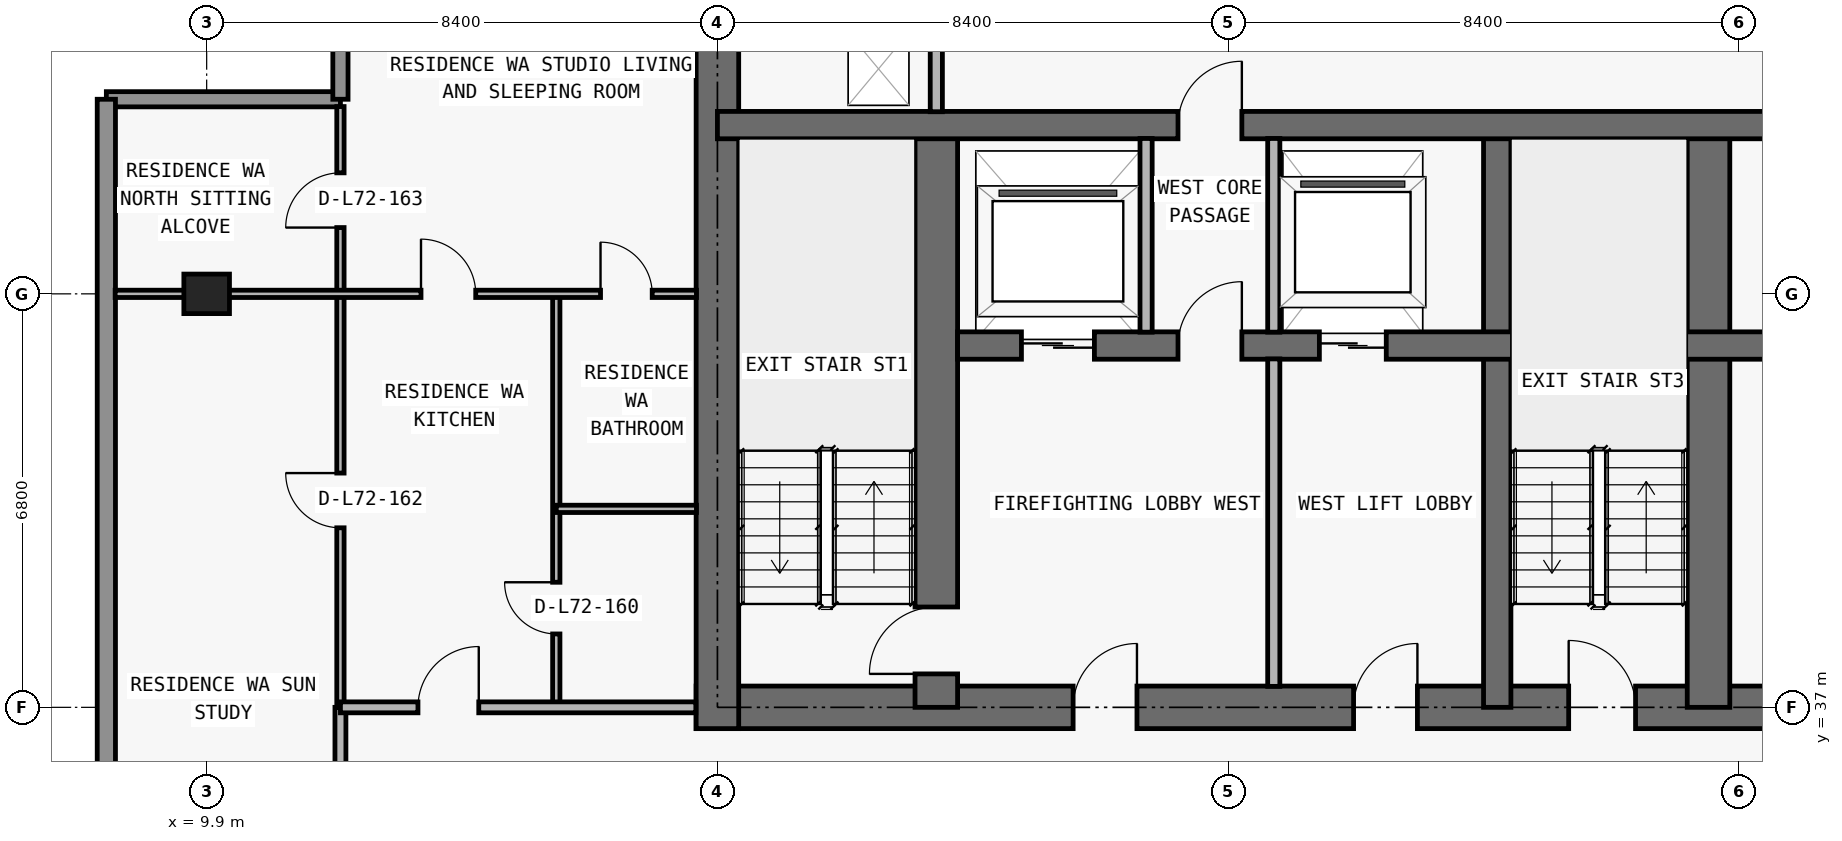
"""IFC4 building model, lengths in metres.
Left out: names, types, materials, properties, quantities, classifications, styles, units other than length and angle.
Written with IfcOpenShell. Run it as: python <this file> out.ifc"""

import sys

from ifc_helpers import new_model, si_unit, direction, frame, frame_2d, origin, origin_2d, place, context, subcontext, project, spatial, rectangle, extrude, element, fill, save


model = new_model("IFC4")
c1 = context("Model", 3, precision=1e-05, world=origin(), true_north=direction((0.0, 1.0)))
c2 = subcontext(c1, "Body", "Model", "MODEL_VIEW")
j1 = project(units=[si_unit("LENGTHUNIT", "METRE"), si_unit("PLANEANGLEUNIT", "RADIAN")], contexts=[c1])
p1 = place(None, origin())
s1 = spatial("IfcSite", under=j1, at=p1, CompositionType="ELEMENT")
p2 = place(p1, origin())
s2 = spatial("IfcBuilding", under=s1, at=p2, CompositionType="ELEMENT")
p3 = place(p2, frame((0.0, 0.0, 256.2)))
s3 = spatial("IfcBuildingStorey", under=s2, at=p3, CompositionType="ELEMENT", Elevation=256.2)
p4 = place(p3, frame((9.9, 43.8, 0.0), z_axis=(0.0, 0.0, 1.0), x_axis=(1.0, 0.0, 0.0)))
e1 = element("IfcColumn", 1, at=p4, inside=s3, PredefinedType="COLUMN", context=c2, shape_type="SweptSolid", body=[
    extrude(rectangle(XDim=0.75, YDim=0.65, at=origin_2d()), origin(), (0.0, 0.0, 1.0), 3.05),
])
p5 = place(p3, frame((17.95, 37.0, 0.0), z_axis=(0.0, 0.0, 1.0), x_axis=(1.0, 0.0, 0.0)))
e2 = element("IfcWall", 2, at=p5, inside=s3, PredefinedType="SHEAR", context=c2, shape_type="SweptSolid", body=[
    extrude(rectangle(XDim=41.9, YDim=0.7, at=frame_2d((20.95, 0.0))), origin(), (0.0, 0.0, 1.0), 3.05),
])
p6 = place(p5, frame((14.35, 0.0, 0.0)))
e3 = element("IfcOpeningElement", 3, at=p6, cuts=e2, PredefinedType="OPENING", context=c2, shape_type="SweptSolid", body=[
    extrude(rectangle(XDim=1.1, YDim=2.15, at=frame_2d((0.55, 1.075))), frame((0.0, 0.36, 0.0), z_axis=(0.0, -1.0, 0.0), x_axis=(1.0, 0.0, 0.0)), (0.0, 0.0, 1.0), 0.72),
])
p7 = place(p5, frame((6.2, 0.0, 0.0)))
e4 = element("IfcOpeningElement", 4, at=p7, cuts=e2, PredefinedType="OPENING", context=c2, shape_type="SweptSolid", body=[
    extrude(rectangle(XDim=1.05, YDim=2.15, at=frame_2d((0.525, 1.075))), frame((0.0, 0.36, 0.0), z_axis=(0.0, -1.0, 0.0), x_axis=(1.0, 0.0, 0.0)), (0.0, 0.0, 1.0), 0.72),
])
p8 = place(p5, frame((34.7, 0.0, 0.0)))
e5 = element("IfcOpeningElement", 5, at=p8, cuts=e2, PredefinedType="OPENING", context=c2, shape_type="SweptSolid", body=[
    extrude(rectangle(XDim=1.05, YDim=2.15, at=frame_2d((0.525, 1.075))), frame((0.0, 0.36, 0.0), z_axis=(0.0, -1.0, 0.0), x_axis=(1.0, 0.0, 0.0)), (0.0, 0.0, 1.0), 0.72),
])
p9 = place(p5, frame((10.812, 0.0, 0.0)))
e6 = element("IfcOpeningElement", 6, at=p9, cuts=e2, PredefinedType="OPENING", context=c2, shape_type="SweptSolid", body=[
    extrude(rectangle(XDim=1.05, YDim=2.15, at=frame_2d((0.525, 1.075))), frame((0.0, 0.36, 0.0), z_axis=(0.0, -1.0, 0.0), x_axis=(1.0, 0.0, 0.0)), (0.0, 0.0, 1.0), 0.72),
])
p10 = place(p5, frame((24.05, 0.0, 0.0)))
e7 = element("IfcOpeningElement", 7, at=p10, cuts=e2, PredefinedType="OPENING", context=c2, shape_type="SweptSolid", body=[
    extrude(rectangle(XDim=1.05, YDim=2.15, at=frame_2d((0.525, 1.075))), frame((0.0, 0.36, 0.0), z_axis=(0.0, -1.0, 0.0), x_axis=(1.0, 0.0, 0.0)), (0.0, 0.0, 1.0), 0.72),
])
p11 = place(p3, frame((18.3, 36.65, 0.0), z_axis=(0.0, 0.0, 1.0), x_axis=(0.0, 1.0, 0.0)))
e8 = element("IfcWall", 8, at=p11, inside=s3, PredefinedType="SHEAR", context=c2, shape_type="SweptSolid", body=[
    extrude(rectangle(XDim=13.95, YDim=0.7, at=frame_2d((6.975, 0.0))), origin(), (0.0, 0.0, 1.0), 3.05),
])
p12 = place(p3, frame((21.9, 37.0, 0.0), z_axis=(0.0, 0.0, 1.0), x_axis=(0.0, 1.0, 0.0)))
e9 = element("IfcWall", 9, at=p12, inside=s3, PredefinedType="SHEAR", context=c2, shape_type="SweptSolid", body=[
    extrude(rectangle(XDim=9.575, YDim=0.7, at=frame_2d((4.788, 0.0))), origin(), (0.0, 0.0, 1.0), 3.05),
])
p13 = place(p12, frame((0.55, 0.0, 0.0)))
e10 = element("IfcOpeningElement", 10, at=p13, cuts=e9, PredefinedType="OPENING", context=c2, shape_type="SweptSolid", body=[
    extrude(rectangle(XDim=1.1, YDim=2.15, at=frame_2d((0.55, 1.075))), frame((0.0, 0.36, 0.0), z_axis=(0.0, -1.0, 0.0), x_axis=(1.0, 0.0, 0.0)), (0.0, 0.0, 1.0), 0.72),
])
p14 = place(p3, frame((31.125, 37.0, 0.0), z_axis=(0.0, 0.0, 1.0), x_axis=(0.0, 1.0, 0.0)))
e11 = element("IfcWall", 11, at=p14, inside=s3, PredefinedType="SHEAR", context=c2, shape_type="SweptSolid", body=[
    extrude(rectangle(XDim=9.575, YDim=0.45, at=frame_2d((4.788, 0.0))), origin(), (0.0, 0.0, 1.0), 3.05),
])
p15 = place(p3, frame((34.6, 37.0, 0.0), z_axis=(0.0, 0.0, 1.0), x_axis=(0.0, 1.0, 0.0)))
e12 = element("IfcWall", 12, at=p15, inside=s3, PredefinedType="SHEAR", context=c2, shape_type="SweptSolid", body=[
    extrude(rectangle(XDim=9.575, YDim=0.7, at=frame_2d((4.788, 0.0))), origin(), (0.0, 0.0, 1.0), 3.05),
])
p16 = place(p3, frame((22.25, 42.95, 0.0), z_axis=(0.0, 0.0, 1.0), x_axis=(1.0, 0.0, 0.0)))
e13 = element("IfcWall", 13, at=p16, inside=s3, PredefinedType="SHEAR", context=c2, shape_type="SweptSolid", body=[
    extrude(rectangle(XDim=33.3, YDim=0.45, at=frame_2d((16.65, 0.0))), origin(), (0.0, 0.0, 1.0), 3.05),
])
p17 = place(p16, frame((1.05, 0.0, 0.0)))
e14 = element("IfcOpeningElement", 14, at=p17, cuts=e13, PredefinedType="OPENING", context=c2, shape_type="SweptSolid", body=[
    extrude(rectangle(XDim=1.2, YDim=2.2, at=frame_2d((0.6, 1.1))), frame((0.0, 0.235, 0.0), z_axis=(0.0, -1.0, 0.0), x_axis=(1.0, 0.0, 0.0)), (0.0, 0.0, 1.0), 0.47),
])
p18 = place(p16, frame((31.05, 0.0, 0.0)))
e15 = element("IfcOpeningElement", 15, at=p18, cuts=e13, PredefinedType="OPENING", context=c2, shape_type="SweptSolid", body=[
    extrude(rectangle(XDim=1.2, YDim=2.2, at=frame_2d((0.6, 1.1))), frame((0.0, 0.235, 0.0), z_axis=(0.0, -1.0, 0.0), x_axis=(1.0, 0.0, 0.0)), (0.0, 0.0, 1.0), 0.47),
])
p19 = place(p16, frame((26.45, 0.0, 0.0)))
e16 = element("IfcOpeningElement", 16, at=p19, cuts=e13, PredefinedType="OPENING", context=c2, shape_type="SweptSolid", body=[
    extrude(rectangle(XDim=1.1, YDim=2.2, at=frame_2d((0.55, 1.1))), frame((0.0, 0.235, 0.0), z_axis=(0.0, -1.0, 0.0), x_axis=(1.0, 0.0, 0.0)), (0.0, 0.0, 1.0), 0.47),
])
p20 = place(p16, frame((5.95, 0.0, 0.0)))
e17 = element("IfcOpeningElement", 17, at=p20, cuts=e13, PredefinedType="OPENING", context=c2, shape_type="SweptSolid", body=[
    extrude(rectangle(XDim=1.1, YDim=2.2, at=frame_2d((0.55, 1.1))), frame((0.0, 0.235, 0.0), z_axis=(0.0, -1.0, 0.0), x_axis=(1.0, 0.0, 0.0)), (0.0, 0.0, 1.0), 0.47),
])
p21 = place(p16, frame((3.625, 0.0, 0.0)))
e18 = element("IfcOpeningElement", 18, at=p21, cuts=e13, PredefinedType="OPENING", context=c2, shape_type="SweptSolid", body=[
    extrude(rectangle(XDim=1.05, YDim=2.15, at=frame_2d((0.525, 1.075))), frame((0.0, 0.235, 0.0), z_axis=(0.0, -1.0, 0.0), x_axis=(1.0, 0.0, 0.0)), (0.0, 0.0, 1.0), 0.47),
])
p22 = place(p16, frame((28.675, 0.0, 0.0)))
e19 = element("IfcOpeningElement", 19, at=p22, cuts=e13, PredefinedType="OPENING", context=c2, shape_type="SweptSolid", body=[
    extrude(rectangle(XDim=1.05, YDim=2.15, at=frame_2d((0.525, 1.075))), frame((0.0, 0.235, 0.0), z_axis=(0.0, -1.0, 0.0), x_axis=(1.0, 0.0, 0.0)), (0.0, 0.0, 1.0), 0.47),
])
p23 = place(p16, frame((15.225, 0.0, 0.0)))
e20 = element("IfcOpeningElement", 20, at=p23, cuts=e13, PredefinedType="OPENING", context=c2, shape_type="SweptSolid", body=[
    extrude(rectangle(XDim=1.0, YDim=2.2, at=frame_2d((0.5, 1.1))), frame((0.0, 0.235, 0.0), z_axis=(0.0, -1.0, 0.0), x_axis=(1.0, 0.0, 0.0)), (0.0, 0.0, 1.0), 0.47),
])
p24 = place(p16, frame((21.975, 0.0, 0.0)))
e21 = element("IfcOpeningElement", 21, at=p24, cuts=e13, PredefinedType="OPENING", context=c2, shape_type="SweptSolid", body=[
    extrude(rectangle(XDim=1.0, YDim=2.2, at=frame_2d((0.5, 1.1))), frame((0.0, 0.235, 0.0), z_axis=(0.0, -1.0, 0.0), x_axis=(1.0, 0.0, 0.0)), (0.0, 0.0, 1.0), 0.47),
])
p25 = place(p3, frame((18.3, 46.575, 0.0), z_axis=(0.0, 0.0, 1.0), x_axis=(1.0, 0.0, 0.0)))
e22 = element("IfcWall", 22, at=p25, inside=s3, PredefinedType="SHEAR", context=c2, shape_type="SweptSolid", body=[
    extrude(rectangle(XDim=41.2, YDim=0.45, at=frame_2d((20.6, 0.0))), origin(), (0.0, 0.0, 1.0), 3.05),
])
p26 = place(p25, frame((7.575, 0.0, 0.0)))
e23 = element("IfcOpeningElement", 23, at=p26, cuts=e22, PredefinedType="OPENING", context=c2, shape_type="SweptSolid", body=[
    extrude(rectangle(XDim=1.05, YDim=2.15, at=frame_2d((0.525, 1.075))), frame((0.0, 0.235, 0.0), z_axis=(0.0, -1.0, 0.0), x_axis=(1.0, 0.0, 0.0)), (0.0, 0.0, 1.0), 0.47),
])
p27 = place(p25, frame((32.625, 0.0, 0.0)))
e24 = element("IfcOpeningElement", 24, at=p27, cuts=e22, PredefinedType="OPENING", context=c2, shape_type="SweptSolid", body=[
    extrude(rectangle(XDim=1.05, YDim=2.15, at=frame_2d((0.525, 1.075))), frame((0.0, 0.235, 0.0), z_axis=(0.0, -1.0, 0.0), x_axis=(1.0, 0.0, 0.0)), (0.0, 0.0, 1.0), 0.47),
])
p28 = place(p3, frame((8.25, 47.0, 0.0), z_axis=(0.0, 0.0, 1.0), x_axis=(1.0, 0.0, 0.0)))
e25 = element("IfcWall", 25, at=p28, inside=s3, PredefinedType="ELEMENTEDWALL", context=c2, shape_type="SweptSolid", body=[
    extrude(rectangle(XDim=3.85, YDim=0.25, at=frame_2d((1.925, 0.0))), origin(), (0.0, 0.0, 1.0), 3.05),
])
p29 = place(p3, frame((12.1, 47.0, 0.0), z_axis=(0.0, 0.0, 1.0), x_axis=(0.0, 1.0, 0.0)))
e26 = element("IfcWall", 26, at=p29, inside=s3, PredefinedType="ELEMENTEDWALL", context=c2, shape_type="SweptSolid", body=[
    extrude(rectangle(XDim=3.45, YDim=0.25, at=frame_2d((1.725, 0.0))), origin(), (0.0, 0.0, 1.0), 3.05),
])
p30 = place(p3, frame((8.25, 30.15, 0.0), z_axis=(0.0, 0.0, 1.0), x_axis=(0.0, 1.0, 0.0)))
e27 = element("IfcWall", 27, at=p30, inside=s3, PredefinedType="STANDARD", context=c2, shape_type="SweptSolid", body=[
    extrude(rectangle(XDim=16.85, YDim=0.3, at=frame_2d((8.425, 0.0))), origin(), (0.0, 0.0, 1.0), 3.05),
])
p31 = place(p3, frame((12.1, 34.305, 0.0), z_axis=(0.0, 0.0, 1.0), x_axis=(0.0, 1.0, 0.0)))
e28 = element("IfcWall", 28, at=p31, inside=s3, PredefinedType="PARTITIONING", context=c2, shape_type="SweptSolid", body=[
    extrude(rectangle(XDim=2.695, YDim=0.18, at=frame_2d((1.348, 0.0))), origin(), (0.0, 0.0, 1.0), 3.05),
])
p32 = place(p3, frame((12.1, 37.005, 0.0), z_axis=(0.0, 0.0, 1.0), x_axis=(0.0, 1.0, 0.0)))
e29 = element("IfcWall", 29, at=p32, inside=s3, PredefinedType="PARTITIONING", context=c2, shape_type="SweptSolid", body=[
    extrude(rectangle(XDim=9.875, YDim=0.12, at=frame_2d((4.938, 0.0))), origin(), (0.0, 0.0, 1.0), 3.05),
])
p33 = place(p32, frame((2.948, 0.0, 0.0)))
e30 = element("IfcOpeningElement", 30, at=p33, cuts=e29, PredefinedType="OPENING", context=c2, shape_type="SweptSolid", body=[
    extrude(rectangle(XDim=0.9, YDim=2.15, at=frame_2d((0.45, 1.075))), frame((0.0, 0.07, 0.0), z_axis=(0.0, -1.0, 0.0), x_axis=(1.0, 0.0, 0.0)), (0.0, 0.0, 1.0), 0.14),
])
p34 = place(p32, frame((7.885, 0.0, 0.0)))
e31 = element("IfcOpeningElement", 31, at=p34, cuts=e29, PredefinedType="OPENING", context=c2, shape_type="SweptSolid", body=[
    extrude(rectangle(XDim=0.9, YDim=2.15, at=frame_2d((0.45, 1.075))), frame((0.0, 0.07, 0.0), z_axis=(0.0, -1.0, 0.0), x_axis=(1.0, 0.0, 0.0)), (0.0, 0.0, 1.0), 0.14),
])
p35 = place(p3, frame((15.65, 37.0, 0.0), z_axis=(0.0, 0.0, 1.0), x_axis=(0.0, 1.0, 0.0)))
e32 = element("IfcWall", 32, at=p35, inside=s3, PredefinedType="PARTITIONING", context=c2, shape_type="SweptSolid", body=[
    extrude(rectangle(XDim=6.8, YDim=0.12, at=frame_2d((3.4, 0.0))), origin(), (0.0, 0.0, 1.0), 2.725),
])
p36 = place(p35, frame((1.207, 0.0, 0.0)))
e33 = element("IfcOpeningElement", 33, at=p36, cuts=e32, PredefinedType="OPENING", context=c2, shape_type="SweptSolid", body=[
    extrude(rectangle(XDim=0.85, YDim=2.1, at=frame_2d((0.425, 1.05))), frame((0.0, 0.07, 0.0), z_axis=(0.0, -1.0, 0.0), x_axis=(1.0, 0.0, 0.0)), (0.0, 0.0, 1.0), 0.14),
])
p37 = place(p3, frame((21.9, 46.795, 0.0), z_axis=(0.0, 0.0, 1.0), x_axis=(0.0, 1.0, 0.0)))
e34 = element("IfcWall", 34, at=p37, inside=s3, PredefinedType="PARTITIONING", context=c2, shape_type="SweptSolid", body=[
    extrude(rectangle(XDim=3.16, YDim=0.2, at=frame_2d((1.58, 0.0))), origin(), (0.0, 0.0, 1.0), 3.05),
])
p38 = place(p3, frame((25.35, 43.17, 0.0), z_axis=(0.0, 0.0, 1.0), x_axis=(0.0, 1.0, 0.0)))
e35 = element("IfcWall", 35, at=p38, inside=s3, PredefinedType="PARTITIONING", context=c2, shape_type="SweptSolid", body=[
    extrude(rectangle(XDim=3.185, YDim=0.2, at=frame_2d((1.593, 0.0))), origin(), (0.0, 0.0, 1.0), 3.05),
])
p39 = place(p3, frame((27.45, 37.345, 0.0), z_axis=(0.0, 0.0, 1.0), x_axis=(0.0, 1.0, 0.0)))
e36 = element("IfcWall", 36, at=p39, inside=s3, PredefinedType="PARTITIONING", context=c2, shape_type="SweptSolid", body=[
    extrude(rectangle(XDim=5.385, YDim=0.2, at=frame_2d((2.692, 0.0))), origin(), (0.0, 0.0, 1.0), 3.05),
])
p40 = place(p3, frame((27.45, 43.17, 0.0), z_axis=(0.0, 0.0, 1.0), x_axis=(0.0, 1.0, 0.0)))
e37 = element("IfcWall", 37, at=p40, inside=s3, PredefinedType="PARTITIONING", context=c2, shape_type="SweptSolid", body=[
    extrude(rectangle(XDim=3.185, YDim=0.2, at=frame_2d((1.593, 0.0))), origin(), (0.0, 0.0, 1.0), 3.05),
])
p41 = place(p3, frame((12.1, 37.0, 0.0), z_axis=(0.0, 0.0, 1.0), x_axis=(1.0, 0.0, 0.0)))
e38 = element("IfcWall", 38, at=p41, inside=s3, PredefinedType="PARTITIONING", context=c2, shape_type="SweptSolid", body=[
    extrude(rectangle(XDim=5.845, YDim=0.18, at=frame_2d((2.922, 0.0))), origin(), (0.0, 0.0, 1.0), 3.05),
])
p42 = place(p41, frame((1.275, 0.0, 0.0)))
e39 = element("IfcOpeningElement", 39, at=p42, cuts=e38, PredefinedType="OPENING", context=c2, shape_type="SweptSolid", body=[
    extrude(rectangle(XDim=1.0, YDim=2.2, at=frame_2d((0.5, 1.1))), frame((0.0, 0.1, 0.0), z_axis=(0.0, -1.0, 0.0), x_axis=(1.0, 0.0, 0.0)), (0.0, 0.0, 1.0), 0.2),
])
p43 = place(p3, frame((15.65, 40.264, 0.0), z_axis=(0.0, 0.0, 1.0), x_axis=(1.0, 0.0, 0.0)))
e40 = element("IfcWall", 40, at=p43, inside=s3, PredefinedType="PARTITIONING", context=c2, shape_type="SweptSolid", body=[
    extrude(rectangle(XDim=2.305, YDim=0.12, at=frame_2d((1.153, 0.0))), origin(), (0.0, 0.0, 1.0), 3.05),
])
p44 = place(p3, frame((8.395, 43.8, 0.0), z_axis=(0.0, 0.0, 1.0), x_axis=(1.0, 0.0, 0.0)))
e41 = element("IfcWall", 41, at=p44, inside=s3, PredefinedType="PARTITIONING", context=c2, shape_type="SweptSolid", body=[
    extrude(rectangle(XDim=9.56, YDim=0.12, at=frame_2d((4.78, 0.0))), origin(), (0.0, 0.0, 1.0), 2.418),
])
p45 = place(p44, frame((5.03, 0.0, 0.0)))
e42 = element("IfcOpeningElement", 42, at=p45, cuts=e41, PredefinedType="OPENING", context=c2, shape_type="SweptSolid", body=[
    extrude(rectangle(XDim=0.9, YDim=2.15, at=frame_2d((0.45, 1.075))), frame((0.0, 0.07, 0.0), z_axis=(0.0, -1.0, 0.0), x_axis=(1.0, 0.0, 0.0)), (0.0, 0.0, 1.0), 0.14),
])
p46 = place(p44, frame((7.982, 0.0, 0.0)))
e43 = element("IfcOpeningElement", 43, at=p46, cuts=e41, PredefinedType="OPENING", context=c2, shape_type="SweptSolid", body=[
    extrude(rectangle(XDim=0.85, YDim=2.1, at=frame_2d((0.425, 1.05))), frame((0.0, 0.07, 0.0), z_axis=(0.0, -1.0, 0.0), x_axis=(1.0, 0.0, 0.0)), (0.0, 0.0, 1.0), 0.14),
])
p47 = place(p17, origin())
e44 = element("IfcDoor", 44, at=p47, inside=s3, OperationType="DOUBLE_DOOR_SLIDING", PredefinedType="DOOR", context=c2, shape_type="SweptSolid", body=[
    extrude(rectangle(XDim=1.2, YDim=2.2, at=frame_2d((0.6, 1.1))), frame((0.0, 0.025, 0.0), z_axis=(0.0, -1.0, 0.0), x_axis=(1.0, 0.0, 0.0)), (0.0, 0.0, 1.0), 0.05),
])
fill(e14, e44)
p48 = place(p20, origin())
e45 = element("IfcDoor", 45, at=p48, inside=s3, OperationType="DOUBLE_DOOR_SLIDING", PredefinedType="DOOR", context=c2, shape_type="SweptSolid", body=[
    extrude(rectangle(XDim=1.1, YDim=2.2, at=frame_2d((0.55, 1.1))), frame((0.0, 0.025, 0.0), z_axis=(0.0, -1.0, 0.0), x_axis=(1.0, 0.0, 0.0)), (0.0, 0.0, 1.0), 0.05),
])
fill(e17, e45)
p49 = place(p6, origin())
e46 = element("IfcDoor", 46, at=p49, inside=s3, OperationType="SINGLE_SWING_LEFT", PredefinedType="DOOR", context=c2, shape_type="SweptSolid", body=[
    extrude(rectangle(XDim=1.1, YDim=2.15, at=frame_2d((0.55, 1.075))), frame((0.0, 0.025, 0.0), z_axis=(0.0, -1.0, 0.0), x_axis=(1.0, 0.0, 0.0)), (0.0, 0.0, 1.0), 0.05),
])
fill(e3, e46)
p50 = place(p7, origin())
e47 = element("IfcDoor", 47, at=p50, inside=s3, OperationType="SINGLE_SWING_RIGHT", PredefinedType="DOOR", context=c2, shape_type="SweptSolid", body=[
    extrude(rectangle(XDim=1.05, YDim=2.15, at=frame_2d((0.525, 1.075))), frame((0.0, 0.025, 0.0), z_axis=(0.0, -1.0, 0.0), x_axis=(1.0, 0.0, 0.0)), (0.0, 0.0, 1.0), 0.05),
])
fill(e4, e47)
p51 = place(p13, origin())
e48 = element("IfcDoor", 48, at=p51, inside=s3, OperationType="SINGLE_SWING_LEFT", PredefinedType="DOOR", context=c2, shape_type="SweptSolid", body=[
    extrude(rectangle(XDim=1.1, YDim=2.15, at=frame_2d((0.55, 1.075))), frame((0.0, 0.025, 0.0), z_axis=(0.0, -1.0, 0.0), x_axis=(1.0, 0.0, 0.0)), (0.0, 0.0, 1.0), 0.05),
])
fill(e10, e48)
p52 = place(p21, origin())
e49 = element("IfcDoor", 49, at=p52, inside=s3, OperationType="SINGLE_SWING_RIGHT", PredefinedType="DOOR", context=c2, shape_type="SweptSolid", body=[
    extrude(rectangle(XDim=1.05, YDim=2.15, at=frame_2d((0.525, 1.075))), frame((0.0, 0.025, 0.0), z_axis=(0.0, -1.0, 0.0), x_axis=(1.0, 0.0, 0.0)), (0.0, 0.0, 1.0), 0.05),
])
fill(e18, e49)
p53 = place(p9, origin())
e50 = element("IfcDoor", 50, at=p53, inside=s3, OperationType="SINGLE_SWING_RIGHT", PredefinedType="DOOR", context=c2, shape_type="SweptSolid", body=[
    extrude(rectangle(XDim=1.05, YDim=2.15, at=frame_2d((0.525, 1.075))), frame((0.0, 0.025, 0.0), z_axis=(0.0, -1.0, 0.0), x_axis=(1.0, 0.0, 0.0)), (0.0, 0.0, 1.0), 0.05),
])
fill(e6, e50)
p54 = place(p26, origin())
e51 = element("IfcDoor", 51, at=p54, inside=s3, OperationType="SINGLE_SWING_RIGHT", PredefinedType="DOOR", context=c2, shape_type="SweptSolid", body=[
    extrude(rectangle(XDim=1.05, YDim=2.15, at=frame_2d((0.525, 1.075))), frame((0.0, 0.025, 0.0), z_axis=(0.0, -1.0, 0.0), x_axis=(1.0, 0.0, 0.0)), (0.0, 0.0, 1.0), 0.05),
])
fill(e23, e51)
p55 = place(p42, origin())
e52 = element("IfcDoor", 52, at=p55, inside=s3, OperationType="SINGLE_SWING_RIGHT", PredefinedType="DOOR", context=c2, shape_type="SweptSolid", body=[
    extrude(rectangle(XDim=1.0, YDim=2.2, at=frame_2d((0.5, 1.1))), frame((0.0, 0.025, 0.0), z_axis=(0.0, -1.0, 0.0), x_axis=(1.0, 0.0, 0.0)), (0.0, 0.0, 1.0), 0.05),
])
fill(e39, e52)
p56 = place(p45, origin())
e53 = element("IfcDoor", 53, at=p56, inside=s3, OperationType="SINGLE_SWING_LEFT", PredefinedType="DOOR", context=c2, shape_type="SweptSolid", body=[
    extrude(rectangle(XDim=0.9, YDim=2.15, at=frame_2d((0.45, 1.075))), frame((0.0, 0.025, 0.0), z_axis=(0.0, -1.0, 0.0), x_axis=(1.0, 0.0, 0.0)), (0.0, 0.0, 1.0), 0.05),
])
fill(e42, e53)
p57 = place(p36, origin())
e54 = element("IfcDoor", 54, at=p57, inside=s3, OperationType="SINGLE_SWING_RIGHT", PredefinedType="DOOR", context=c2, shape_type="SweptSolid", body=[
    extrude(rectangle(XDim=0.85, YDim=2.1, at=frame_2d((0.425, 1.05))), frame((0.0, 0.025, 0.0), z_axis=(0.0, -1.0, 0.0), x_axis=(1.0, 0.0, 0.0)), (0.0, 0.0, 1.0), 0.05),
])
fill(e33, e54)
p58 = place(p46, origin())
e55 = element("IfcDoor", 55, at=p58, inside=s3, OperationType="SINGLE_SWING_LEFT", PredefinedType="DOOR", context=c2, shape_type="SweptSolid", body=[
    extrude(rectangle(XDim=0.85, YDim=2.1, at=frame_2d((0.425, 1.05))), frame((0.0, 0.025, 0.0), z_axis=(0.0, -1.0, 0.0), x_axis=(1.0, 0.0, 0.0)), (0.0, 0.0, 1.0), 0.05),
])
fill(e43, e55)
p59 = place(p33, origin())
e56 = element("IfcDoor", 56, at=p59, inside=s3, OperationType="SINGLE_SWING_RIGHT", PredefinedType="DOOR", context=c2, shape_type="SweptSolid", body=[
    extrude(rectangle(XDim=0.9, YDim=2.15, at=frame_2d((0.45, 1.075))), frame((0.0, 0.025, 0.0), z_axis=(0.0, -1.0, 0.0), x_axis=(1.0, 0.0, 0.0)), (0.0, 0.0, 1.0), 0.05),
])
fill(e30, e56)
p60 = place(p34, origin())
e57 = element("IfcDoor", 57, at=p60, inside=s3, OperationType="SINGLE_SWING_LEFT", PredefinedType="DOOR", context=c2, shape_type="SweptSolid", body=[
    extrude(rectangle(XDim=0.9, YDim=2.15, at=frame_2d((0.45, 1.075))), frame((0.0, 0.025, 0.0), z_axis=(0.0, -1.0, 0.0), x_axis=(1.0, 0.0, 0.0)), (0.0, 0.0, 1.0), 0.05),
])
fill(e31, e57)
save(model, sys.argv[1])
